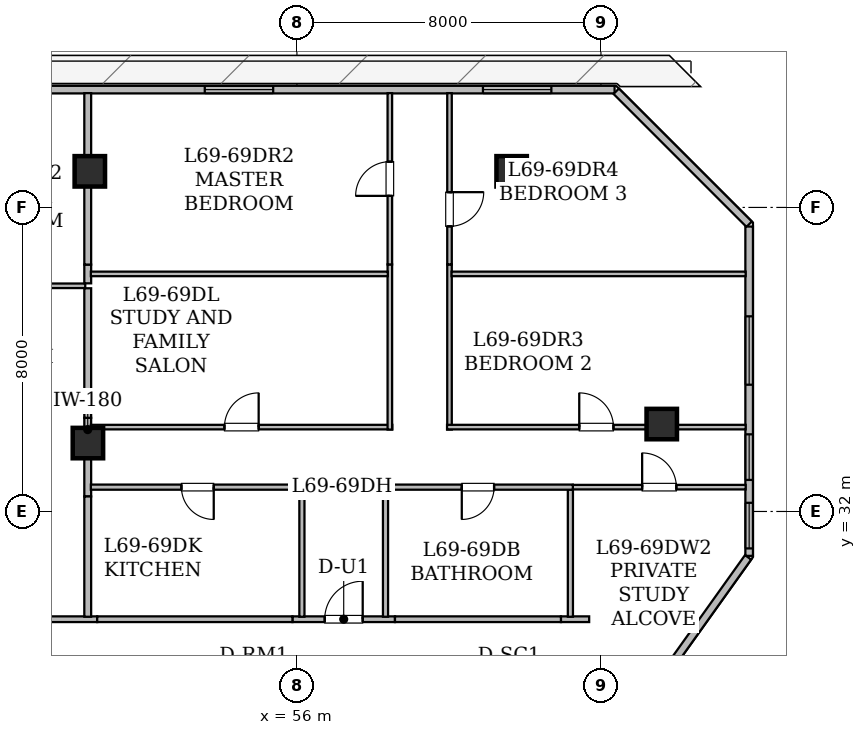
"""IFC4 building model, lengths in metres.
Left out: names, types, materials, properties, quantities, classifications, styles, units other than length and angle.
Written with IfcOpenShell. Run it as: python <this file> out.ifc"""

import sys

from ifc_helpers import new_model, si_unit, direction, frame, frame_2d, origin, origin_2d, place, context, subcontext, project, spatial, rectangle, hollow_rectangle, extrude, element, fill, save


model = new_model("IFC4")
c1 = context("Model", 3, precision=1e-05, world=origin(), true_north=direction((0.0, 1.0)))
c2 = subcontext(c1, "Body", "Model", "MODEL_VIEW")
j1 = project(units=[si_unit("LENGTHUNIT", "METRE"), si_unit("PLANEANGLEUNIT", "RADIAN")], contexts=[c1])
p1 = place(None, origin())
s1 = spatial("IfcSite", under=j1, at=p1, CompositionType="ELEMENT")
p2 = place(p1, origin())
s2 = spatial("IfcBuilding", under=s1, at=p2, CompositionType="ELEMENT")
p3 = place(p2, frame((0.0, 0.0, 269.45)))
s3 = spatial("IfcBuildingStorey", under=s2, at=p3, CompositionType="ELEMENT", Elevation=269.45)
for number, where, z_axis, x_axis in (
    (1, (50.55, 40.95, 0.025), (0.0, 0.0, 1.0), (1.0, 0.0, 0.0)),
    (2, (61.65, 40.95, 0.025), (0.0, 0.0, 1.0), (1.0, 0.0, 0.0)),
    (3, (65.6, 34.3, 0.025), (0.0, 0.0, 1.0), (1.0, 0.0, 0.0)),
    (4, (50.5, 33.8, 0.025), (0.0, 0.0, 1.0), (1.0, 0.0, 0.0)),
):
    element("IfcColumn", number, at=place(p3, frame(where, z_axis=z_axis, x_axis=x_axis)), inside=s3, PredefinedType="COLUMN", context=c2, shape_type="SweptSolid", body=[
        extrude(hollow_rectangle(XDim=0.8, YDim=0.8, WallThickness=0.04, at=origin_2d()), origin(), (0.0, 0.0, 1.0), 4.175),
    ])
p4 = place(p3, frame((25.702, 43.1, 0.0), z_axis=(0.0, 0.0, 1.0), x_axis=(1.0, 0.0, 0.0)))
e5 = element("IfcWall", 5, at=p4, inside=s3, PredefinedType="STANDARD", context=c2, shape_type="SweptSolid", body=[
    extrude(rectangle(XDim=38.657, YDim=0.2, at=frame_2d((19.329, 0.0))), origin(), (0.0, 0.0, 1.0), 3.95),
])
p5 = place(p4, frame((22.05, 0.0, 0.0)))
e6 = element("IfcOpeningElement", 6, at=p5, cuts=e5, PredefinedType="OPENING", context=c2, shape_type="SweptSolid", body=[
    extrude(rectangle(XDim=1.0, YDim=2.15, at=frame_2d((0.5, 1.075))), frame((0.0, 0.11, 0.0), z_axis=(0.0, -1.0, 0.0), x_axis=(1.0, 0.0, 0.0)), (0.0, 0.0, 1.0), 0.22),
])
p6 = place(p4, frame((18.633, 0.0, 0.78)))
e7 = element("IfcOpeningElement", 7, at=p6, cuts=e5, PredefinedType="OPENING", context=c2, shape_type="SweptSolid", body=[
    extrude(rectangle(XDim=1.2, YDim=1.5, at=frame_2d((0.6, 0.75))), frame((0.0, 0.11, 0.0), z_axis=(0.0, -1.0, 0.0), x_axis=(1.0, 0.0, 0.0)), (0.0, 0.0, 1.0), 0.22),
])
p7 = place(p4, frame((27.873, 0.0, 0.85)))
e8 = element("IfcOpeningElement", 8, at=p7, cuts=e5, PredefinedType="OPENING", context=c2, shape_type="SweptSolid", body=[
    extrude(rectangle(XDim=1.8, YDim=0.92, at=frame_2d((0.9, 0.46))), frame((0.0, 0.11, 0.0), z_axis=(0.0, -1.0, 0.0), x_axis=(1.0, 0.0, 0.0)), (0.0, 0.0, 1.0), 0.22),
])
p8 = place(p4, frame((35.193, 0.0, 0.85)))
e9 = element("IfcOpeningElement", 9, at=p8, cuts=e5, PredefinedType="OPENING", context=c2, shape_type="SweptSolid", body=[
    extrude(rectangle(XDim=1.8, YDim=0.92, at=frame_2d((0.9, 0.46))), frame((0.0, 0.11, 0.0), z_axis=(0.0, -1.0, 0.0), x_axis=(1.0, 0.0, 0.0)), (0.0, 0.0, 1.0), 0.22),
])
p9 = place(p3, frame((64.402, 43.057, 0.0), z_axis=(0.0, 0.0, 1.0), x_axis=(0.707106781187, -0.707106781187, 0.0)))
e10 = element("IfcWall", 10, at=p9, inside=s3, PredefinedType="STANDARD", context=c2, shape_type="SweptSolid", body=[
    extrude(rectangle(XDim=4.947, YDim=0.2, at=frame_2d((2.473, 0.0))), origin(), (0.0, 0.0, 1.0), 3.95),
])
p10 = place(p3, frame((67.9, 39.497, 0.0), z_axis=(0.0, 0.0, 1.0), x_axis=(0.0, -1.0, 0.0)))
e11 = element("IfcWall", 11, at=p10, inside=s3, PredefinedType="STANDARD", context=c2, shape_type="SweptSolid", body=[
    extrude(rectangle(XDim=8.665, YDim=0.2, at=frame_2d((4.333, 0.0))), origin(), (0.0, 0.0, 1.0), 3.95),
])
p11 = place(p10, frame((7.269, 0.0, 0.78)))
e12 = element("IfcOpeningElement", 12, at=p11, cuts=e11, PredefinedType="OPENING", context=c2, shape_type="SweptSolid", body=[
    extrude(rectangle(XDim=1.2, YDim=1.5, at=frame_2d((0.6, 0.75))), frame((0.0, 0.11, 0.0), z_axis=(0.0, -1.0, 0.0), x_axis=(1.0, 0.0, 0.0)), (0.0, 0.0, 1.0), 0.22),
])
p12 = place(p10, frame((5.467, 0.0, 0.78)))
e13 = element("IfcOpeningElement", 13, at=p12, cuts=e11, PredefinedType="OPENING", context=c2, shape_type="SweptSolid", body=[
    extrude(rectangle(XDim=1.2, YDim=1.5, at=frame_2d((0.6, 0.75))), frame((0.0, 0.11, 0.0), z_axis=(0.0, -1.0, 0.0), x_axis=(1.0, 0.0, 0.0)), (0.0, 0.0, 1.0), 0.22),
])
p13 = place(p10, frame((2.362, 0.0, 0.85)))
e14 = element("IfcOpeningElement", 14, at=p13, cuts=e11, PredefinedType="OPENING", context=c2, shape_type="SweptSolid", body=[
    extrude(rectangle(XDim=1.8, YDim=0.92, at=frame_2d((0.9, 0.46))), frame((0.0, 0.11, 0.0), z_axis=(0.0, -1.0, 0.0), x_axis=(1.0, 0.0, 0.0)), (0.0, 0.0, 1.0), 0.22),
])
p14 = place(p3, frame((67.872, 30.793, 0.0), z_axis=(0.0, 0.0, 1.0), x_axis=(-0.581265107027, -0.813714246743, 0.0)))
e15 = element("IfcWall", 15, at=p14, inside=s3, PredefinedType="STANDARD", context=c2, shape_type="SweptSolid", body=[
    extrude(rectangle(XDim=3.432, YDim=0.2, at=frame_2d((1.716, 0.0))), origin(), (0.0, 0.0, 1.0), 3.95),
])
p15 = place(p3, frame((45.974, 29.165, 0.0), z_axis=(0.0, 0.0, 1.0), x_axis=(1.0, 0.0, 0.0)))
e16 = element("IfcWall", 16, at=p15, inside=s3, PredefinedType="STANDARD", context=c2, shape_type="SweptSolid", body=[
    extrude(rectangle(XDim=4.77, YDim=0.15, at=frame_2d((2.385, 0.0))), origin(), (0.0, 0.0, 1.0), 3.245),
])
p16 = place(p3, frame((62.947, 29.165, 0.0), z_axis=(0.0, 0.0, 1.0), x_axis=(1.0, 0.0, 0.0)))
e17 = element("IfcWall", 17, at=p16, inside=s3, PredefinedType="STANDARD", context=c2, shape_type="SweptSolid", body=[
    extrude(rectangle(XDim=0.743, YDim=0.15, at=frame_2d((0.372, 0.0))), origin(), (0.0, 0.0, 1.0), 3.95),
])
p17 = place(p3, frame((55.882, 29.165, 0.0), z_axis=(0.0, 0.0, 1.0), x_axis=(1.0, 0.0, 0.0)))
e18 = element("IfcWall", 18, at=p17, inside=s3, PredefinedType="STANDARD", context=c2, shape_type="SweptSolid", body=[
    extrude(rectangle(XDim=2.698, YDim=0.15, at=frame_2d((1.349, 0.0))), origin(), (0.0, 0.0, 1.0), 3.95),
])
p18 = place(p17, frame((0.849, 0.0, 0.0)))
e19 = element("IfcOpeningElement", 19, at=p18, cuts=e18, PredefinedType="OPENING", context=c2, shape_type="SweptSolid", body=[
    extrude(rectangle(XDim=1.0, YDim=2.15, at=frame_2d((0.5, 1.075))), frame((0.0, 0.085, 0.0), z_axis=(0.0, -1.0, 0.0), x_axis=(1.0, 0.0, 0.0)), (0.0, 0.0, 1.0), 0.17),
])
p19 = place(p3, frame((58.58, 29.165, 0.0), z_axis=(0.0, 0.0, 1.0), x_axis=(1.0, 0.0, 0.0)))
e20 = element("IfcWall", 20, at=p19, inside=s3, PredefinedType="STANDARD", context=c2, shape_type="SweptSolid", body=[
    extrude(rectangle(XDim=4.367, YDim=0.15, at=frame_2d((2.184, 0.0))), origin(), (0.0, 0.0, 1.0), 3.95),
])
p20 = place(p3, frame((50.744, 29.165, 0.0), z_axis=(0.0, 0.0, 1.0), x_axis=(1.0, 0.0, 0.0)))
e21 = element("IfcWall", 21, at=p20, inside=s3, PredefinedType="STANDARD", context=c2, shape_type="SweptSolid", body=[
    extrude(rectangle(XDim=5.138, YDim=0.15, at=frame_2d((2.569, 0.0))), origin(), (0.0, 0.0, 1.0), 3.95),
])
p21 = place(p3, frame((45.779, 37.938, 0.0), z_axis=(0.0, 0.0, 1.0), x_axis=(1.0, 0.0, 0.0)))
e22 = element("IfcWall", 22, at=p21, inside=s3, PredefinedType="PARTITIONING", context=c2, shape_type="SweptSolid", body=[
    extrude(rectangle(XDim=4.651, YDim=0.12, at=frame_2d((2.325, 0.0))), origin(), (0.0, 0.0, 1.0), 3.245),
])
p22 = place(p3, frame((50.495, 34.464, 0.0), z_axis=(0.0, 0.0, 1.0), x_axis=(0.0, -1.0, 0.0)))
e23 = element("IfcWall", 23, at=p22, inside=s3, PredefinedType="STANDARD", context=c2, shape_type="SweptSolid", body=[
    extrude(rectangle(XDim=2.069, YDim=0.18, at=frame_2d((1.035, 0.0))), origin(), (0.0, 0.0, 1.0), 3.237),
])
p23 = place(p3, frame((50.495, 32.395, 0.0), z_axis=(0.0, 0.0, 1.0), x_axis=(0.0, -1.0, 0.0)))
e24 = element("IfcWall", 24, at=p23, inside=s3, PredefinedType="STANDARD", context=c2, shape_type="SweptSolid", body=[
    extrude(rectangle(XDim=3.165, YDim=0.18, at=frame_2d((1.583, 0.0))), origin(), (0.0, 0.0, 1.0), 3.237),
])
p24 = place(p3, frame((50.495, 37.873, 0.0), z_axis=(0.0, 0.0, 1.0), x_axis=(0.0, -1.0, 0.0)))
e25 = element("IfcWall", 25, at=p24, inside=s3, PredefinedType="STANDARD", context=c2, shape_type="SweptSolid", body=[
    extrude(rectangle(XDim=3.409, YDim=0.18, at=frame_2d((1.705, 0.0))), origin(), (0.0, 0.0, 1.0), 3.245),
])
p25 = place(p3, frame((50.495, 38.496, 0.0), z_axis=(0.0, 0.0, 1.0), x_axis=(0.0, -1.0, 0.0)))
e26 = element("IfcWall", 26, at=p25, inside=s3, PredefinedType="STANDARD", context=c2, shape_type="SweptSolid", body=[
    extrude(rectangle(XDim=0.493, YDim=0.18, at=frame_2d((0.247, 0.0))), origin(), (0.0, 0.0, 1.0), 3.245),
])
p26 = place(p3, frame((50.495, 43.008, 0.0), z_axis=(0.0, 0.0, 1.0), x_axis=(0.0, -1.0, 0.0)))
e27 = element("IfcWall", 27, at=p26, inside=s3, PredefinedType="STANDARD", context=c2, shape_type="SweptSolid", body=[
    extrude(rectangle(XDim=4.512, YDim=0.18, at=frame_2d((2.256, 0.0))), origin(), (0.0, 0.0, 1.0), 3.245),
])
p27 = place(p3, frame((63.261, 32.64, 0.0), z_axis=(0.0, 0.0, 1.0), x_axis=(1.0, 0.0, 0.0)))
e28 = element("IfcWall", 28, at=p27, inside=s3, PredefinedType="PARTITIONING", context=c2, shape_type="SweptSolid", body=[
    extrude(rectangle(XDim=4.547, YDim=0.12, at=frame_2d((2.273, 0.0))), origin(), (0.0, 0.0, 1.0), 3.407),
])
p28 = place(p27, frame((1.823, 0.0, 0.0)))
e29 = element("IfcOpeningElement", 29, at=p28, cuts=e28, PredefinedType="OPENING", context=c2, shape_type="SweptSolid", body=[
    extrude(rectangle(XDim=0.9, YDim=2.1, at=frame_2d((0.45, 1.05))), frame((0.0, 0.07, 0.0), z_axis=(0.0, -1.0, 0.0), x_axis=(1.0, 0.0, 0.0)), (0.0, 0.0, 1.0), 0.14),
])
p29 = place(p3, frame((63.196, 29.23, 0.0), z_axis=(0.0, 0.0, 1.0), x_axis=(0.0, 1.0, 0.0)))
e30 = element("IfcWall", 30, at=p29, inside=s3, PredefinedType="PARTITIONING", context=c2, shape_type="SweptSolid", body=[
    extrude(rectangle(XDim=3.345, YDim=0.135, at=frame_2d((1.672, 0.0))), origin(), (0.0, 0.0, 1.0), 3.237),
])
p30 = place(p3, frame((63.261, 32.64, 0.0), z_axis=(0.0, 0.0, 1.0), x_axis=(-1.0, 0.0, 0.0)))
e31 = element("IfcWall", 31, at=p30, inside=s3, PredefinedType="PARTITIONING", context=c2, shape_type="SweptSolid", body=[
    extrude(rectangle(XDim=4.995, YDim=0.135, at=frame_2d((2.498, 0.0))), origin(), (0.0, 0.0, 1.0), 3.95),
])
p31 = place(p30, frame((2.073, 0.0, 0.0)))
e32 = element("IfcOpeningElement", 32, at=p31, cuts=e31, PredefinedType="OPENING", context=c2, shape_type="SweptSolid", body=[
    extrude(rectangle(XDim=0.85, YDim=2.1, at=frame_2d((0.425, 1.05))), frame((0.0, 0.077, 0.0), z_axis=(0.0, -1.0, 0.0), x_axis=(1.0, 0.0, 0.0)), (0.0, 0.0, 1.0), 0.155),
])
for number, where, z_axis, x_axis in (
    (33, (58.331, 32.705, 0.0), (0.0, 0.0, 1.0), (0.0, -1.0, 0.0)),
    (34, (56.131, 29.23, 0.0), (0.0, 0.0, 1.0), (0.0, 1.0, 0.0)),
):
    element("IfcWall", number, at=place(p3, frame(where, z_axis=z_axis, x_axis=x_axis)), inside=s3, PredefinedType="PARTITIONING", context=c2, shape_type="SweptSolid", body=[
        extrude(rectangle(XDim=3.475, YDim=0.135, at=frame_2d((1.738, 0.0))), origin(), (0.0, 0.0, 1.0), 3.237),
    ])
p32 = place(p3, frame((56.196, 32.64, 0.0), z_axis=(0.0, 0.0, 1.0), x_axis=(-1.0, 0.0, 0.0)))
e35 = element("IfcWall", 35, at=p32, inside=s3, PredefinedType="PARTITIONING", context=c2, shape_type="SweptSolid", body=[
    extrude(rectangle(XDim=5.619, YDim=0.135, at=frame_2d((2.81, 0.0))), origin(), (0.0, 0.0, 1.0), 3.245),
])
p33 = place(p32, frame((2.385, 0.0, 0.0)))
e36 = element("IfcOpeningElement", 36, at=p33, cuts=e35, PredefinedType="OPENING", context=c2, shape_type="SweptSolid", body=[
    extrude(rectangle(XDim=0.85, YDim=2.1, at=frame_2d((0.425, 1.05))), frame((0.0, 0.077, 0.0), z_axis=(0.0, -1.0, 0.0), x_axis=(1.0, 0.0, 0.0)), (0.0, 0.0, 1.0), 0.155),
])
p34 = place(p3, frame((50.577, 34.22, 0.0), z_axis=(0.0, 0.0, 1.0), x_axis=(1.0, 0.0, 0.0)))
e37 = element("IfcWall", 37, at=p34, inside=s3, PredefinedType="PARTITIONING", context=c2, shape_type="SweptSolid", body=[
    extrude(rectangle(XDim=7.933, YDim=0.12, at=frame_2d((3.967, 0.0))), origin(), (0.0, 0.0, 1.0), 3.237),
])
p35 = place(p34, frame((3.516, 0.0, 0.0)))
e38 = element("IfcOpeningElement", 38, at=p35, cuts=e37, PredefinedType="OPENING", context=c2, shape_type="SweptSolid", body=[
    extrude(rectangle(XDim=0.9, YDim=2.1, at=frame_2d((0.45, 1.05))), frame((0.0, 0.07, 0.0), z_axis=(0.0, -1.0, 0.0), x_axis=(1.0, 0.0, 0.0)), (0.0, 0.0, 1.0), 0.14),
])
p36 = place(p3, frame((58.445, 34.155, 0.0), z_axis=(0.0, 0.0, 1.0), x_axis=(0.0, 1.0, 0.0)))
e39 = element("IfcWall", 39, at=p36, inside=s3, PredefinedType="PARTITIONING", context=c2, shape_type="SweptSolid", body=[
    extrude(rectangle(XDim=4.345, YDim=0.12, at=frame_2d((2.172, 0.0))), origin(), (0.0, 0.0, 1.0), 3.237),
])
p37 = place(p3, frame((58.445, 38.5, 0.0), z_axis=(0.0, 0.0, 1.0), x_axis=(0.0, 1.0, 0.0)))
e40 = element("IfcWall", 40, at=p37, inside=s3, PredefinedType="PARTITIONING", context=c2, shape_type="SweptSolid", body=[
    extrude(rectangle(XDim=4.508, YDim=0.12, at=frame_2d((2.254, 0.0))), origin(), (0.0, 0.0, 1.0), 3.245),
])
p38 = place(p37, frame((1.804, 0.0, 0.0)))
e41 = element("IfcOpeningElement", 41, at=p38, cuts=e40, PredefinedType="OPENING", context=c2, shape_type="SweptSolid", body=[
    extrude(rectangle(XDim=0.9, YDim=2.1, at=frame_2d((0.45, 1.05))), frame((0.0, 0.07, 0.0), z_axis=(0.0, -1.0, 0.0), x_axis=(1.0, 0.0, 0.0)), (0.0, 0.0, 1.0), 0.14),
])
p39 = place(p3, frame((60.015, 38.5, 0.0), z_axis=(0.0, 0.0, 1.0), x_axis=(0.0, -1.0, 0.0)))
e42 = element("IfcWall", 42, at=p39, inside=s3, PredefinedType="PARTITIONING", context=c2, shape_type="SweptSolid", body=[
    extrude(rectangle(XDim=4.345, YDim=0.12, at=frame_2d((2.172, 0.0))), origin(), (0.0, 0.0, 1.0), 3.237),
])
p40 = place(p3, frame((59.95, 34.22, 0.0), z_axis=(0.0, 0.0, 1.0), x_axis=(1.0, 0.0, 0.0)))
e43 = element("IfcWall", 43, at=p40, inside=s3, PredefinedType="PARTITIONING", context=c2, shape_type="SweptSolid", body=[
    extrude(rectangle(XDim=7.858, YDim=0.12, at=frame_2d((3.929, 0.0))), origin(), (0.0, 0.0, 1.0), 3.237),
])
p41 = place(p40, frame((3.479, 0.0, 0.0)))
e44 = element("IfcOpeningElement", 44, at=p41, cuts=e43, PredefinedType="OPENING", context=c2, shape_type="SweptSolid", body=[
    extrude(rectangle(XDim=0.9, YDim=2.1, at=frame_2d((0.45, 1.05))), frame((0.0, 0.07, 0.0), z_axis=(0.0, -1.0, 0.0), x_axis=(1.0, 0.0, 0.0)), (0.0, 0.0, 1.0), 0.14),
])
p42 = place(p3, frame((60.015, 43.008, 0.0), z_axis=(0.0, 0.0, 1.0), x_axis=(0.0, -1.0, 0.0)))
e45 = element("IfcWall", 45, at=p42, inside=s3, PredefinedType="PARTITIONING", context=c2, shape_type="SweptSolid", body=[
    extrude(rectangle(XDim=4.508, YDim=0.12, at=frame_2d((2.254, 0.0))), origin(), (0.0, 0.0, 1.0), 3.245),
])
p43 = place(p42, frame((2.606, 0.0, 0.0)))
e46 = element("IfcOpeningElement", 46, at=p43, cuts=e45, PredefinedType="OPENING", context=c2, shape_type="SweptSolid", body=[
    extrude(rectangle(XDim=0.9, YDim=2.1, at=frame_2d((0.45, 1.05))), frame((0.0, 0.07, 0.0), z_axis=(0.0, -1.0, 0.0), x_axis=(1.0, 0.0, 0.0)), (0.0, 0.0, 1.0), 0.14),
])
p44 = place(p3, frame((50.577, 38.251, 0.0), z_axis=(0.0, 0.0, 1.0), x_axis=(1.0, 0.0, 0.0)))
e47 = element("IfcWall", 47, at=p44, inside=s3, PredefinedType="PARTITIONING", context=c2, shape_type="SweptSolid", body=[
    extrude(rectangle(XDim=7.814, YDim=0.12, at=frame_2d((3.907, 0.0))), origin(), (0.0, 0.0, 1.0), 3.245),
])
p45 = place(p3, frame((60.069, 38.251, 0.0), z_axis=(0.0, 0.0, 1.0), x_axis=(1.0, 0.0, 0.0)))
e48 = element("IfcWall", 48, at=p45, inside=s3, PredefinedType="PARTITIONING", context=c2, shape_type="SweptSolid", body=[
    extrude(rectangle(XDim=7.739, YDim=0.12, at=frame_2d((3.87, 0.0))), origin(), (0.0, 0.0, 1.0), 3.407),
])
p46 = place(p11, origin())
e49 = element("IfcWindow", 49, at=p46, inside=s3, PartitioningType="SINGLE_PANEL", PredefinedType="WINDOW", context=c2, shape_type="SweptSolid", body=[
    extrude(rectangle(XDim=1.2, YDim=1.5, at=frame_2d((0.6, 0.75))), frame((0.0, 0.03, 0.0), z_axis=(0.0, -1.0, 0.0), x_axis=(1.0, 0.0, 0.0)), (0.0, 0.0, 1.0), 0.06),
])
fill(e12, e49)
p47 = place(p12, origin())
e50 = element("IfcWindow", 50, at=p47, inside=s3, PartitioningType="SINGLE_PANEL", PredefinedType="WINDOW", context=c2, shape_type="SweptSolid", body=[
    extrude(rectangle(XDim=1.2, YDim=1.5, at=frame_2d((0.6, 0.75))), frame((0.0, 0.03, 0.0), z_axis=(0.0, -1.0, 0.0), x_axis=(1.0, 0.0, 0.0)), (0.0, 0.0, 1.0), 0.06),
])
fill(e13, e50)
p48 = place(p7, origin())
e51 = element("IfcWindow", 51, at=p48, inside=s3, PartitioningType="SINGLE_PANEL", PredefinedType="WINDOW", context=c2, shape_type="SweptSolid", body=[
    extrude(rectangle(XDim=1.8, YDim=0.92, at=frame_2d((0.9, 0.46))), frame((0.0, 0.03, 0.0), z_axis=(0.0, -1.0, 0.0), x_axis=(1.0, 0.0, 0.0)), (0.0, 0.0, 1.0), 0.06),
])
fill(e8, e51)
p49 = place(p13, origin())
e52 = element("IfcWindow", 52, at=p49, inside=s3, PartitioningType="SINGLE_PANEL", PredefinedType="WINDOW", context=c2, shape_type="SweptSolid", body=[
    extrude(rectangle(XDim=1.8, YDim=0.92, at=frame_2d((0.9, 0.46))), frame((0.0, 0.03, 0.0), z_axis=(0.0, -1.0, 0.0), x_axis=(1.0, 0.0, 0.0)), (0.0, 0.0, 1.0), 0.06),
])
fill(e14, e52)
p50 = place(p8, origin())
e53 = element("IfcWindow", 53, at=p50, inside=s3, PartitioningType="SINGLE_PANEL", PredefinedType="WINDOW", context=c2, shape_type="SweptSolid", body=[
    extrude(rectangle(XDim=1.8, YDim=0.92, at=frame_2d((0.9, 0.46))), frame((0.0, 0.03, 0.0), z_axis=(0.0, -1.0, 0.0), x_axis=(1.0, 0.0, 0.0)), (0.0, 0.0, 1.0), 0.06),
])
fill(e9, e53)
p51 = place(p18, origin())
e54 = element("IfcDoor", 54, at=p51, inside=s3, OperationType="SINGLE_SWING_RIGHT", PredefinedType="DOOR", context=c2, shape_type="SweptSolid", body=[
    extrude(rectangle(XDim=1.0, YDim=2.15, at=frame_2d((0.5, 1.075))), frame((0.0, 0.025, 0.0), z_axis=(0.0, -1.0, 0.0), x_axis=(1.0, 0.0, 0.0)), (0.0, 0.0, 1.0), 0.05),
])
fill(e19, e54)
p52 = place(p28, origin())
e55 = element("IfcDoor", 55, at=p52, inside=s3, OperationType="SINGLE_SWING_LEFT", PredefinedType="DOOR", context=c2, shape_type="SweptSolid", body=[
    extrude(rectangle(XDim=0.9, YDim=2.1, at=frame_2d((0.45, 1.05))), frame((0.0, 0.025, 0.0), z_axis=(0.0, -1.0, 0.0), x_axis=(1.0, 0.0, 0.0)), (0.0, 0.0, 1.0), 0.05),
])
fill(e29, e55)
p53 = place(p31, origin())
e56 = element("IfcDoor", 56, at=p53, inside=s3, OperationType="SINGLE_SWING_RIGHT", PredefinedType="DOOR", context=c2, shape_type="SweptSolid", body=[
    extrude(rectangle(XDim=0.85, YDim=2.1, at=frame_2d((0.425, 1.05))), frame((0.0, 0.025, 0.0), z_axis=(0.0, -1.0, 0.0), x_axis=(1.0, 0.0, 0.0)), (0.0, 0.0, 1.0), 0.05),
])
fill(e32, e56)
p54 = place(p33, origin())
e57 = element("IfcDoor", 57, at=p54, inside=s3, OperationType="SINGLE_SWING_LEFT", PredefinedType="DOOR", context=c2, shape_type="SweptSolid", body=[
    extrude(rectangle(XDim=0.85, YDim=2.1, at=frame_2d((0.425, 1.05))), frame((0.0, 0.025, 0.0), z_axis=(0.0, -1.0, 0.0), x_axis=(1.0, 0.0, 0.0)), (0.0, 0.0, 1.0), 0.05),
])
fill(e36, e57)
p55 = place(p35, origin())
e58 = element("IfcDoor", 58, at=p55, inside=s3, OperationType="SINGLE_SWING_RIGHT", PredefinedType="DOOR", context=c2, shape_type="SweptSolid", body=[
    extrude(rectangle(XDim=0.9, YDim=2.1, at=frame_2d((0.45, 1.05))), frame((0.0, 0.025, 0.0), z_axis=(0.0, -1.0, 0.0), x_axis=(1.0, 0.0, 0.0)), (0.0, 0.0, 1.0), 0.05),
])
fill(e38, e58)
p56 = place(p38, origin())
e59 = element("IfcDoor", 59, at=p56, inside=s3, OperationType="SINGLE_SWING_LEFT", PredefinedType="DOOR", context=c2, shape_type="SweptSolid", body=[
    extrude(rectangle(XDim=0.9, YDim=2.1, at=frame_2d((0.45, 1.05))), frame((0.0, 0.025, 0.0), z_axis=(0.0, -1.0, 0.0), x_axis=(1.0, 0.0, 0.0)), (0.0, 0.0, 1.0), 0.05),
])
fill(e41, e59)
p57 = place(p41, origin())
e60 = element("IfcDoor", 60, at=p57, inside=s3, OperationType="SINGLE_SWING_LEFT", PredefinedType="DOOR", context=c2, shape_type="SweptSolid", body=[
    extrude(rectangle(XDim=0.9, YDim=2.1, at=frame_2d((0.45, 1.05))), frame((0.0, 0.025, 0.0), z_axis=(0.0, -1.0, 0.0), x_axis=(1.0, 0.0, 0.0)), (0.0, 0.0, 1.0), 0.05),
])
fill(e44, e60)
p58 = place(p43, origin())
e61 = element("IfcDoor", 61, at=p58, inside=s3, OperationType="SINGLE_SWING_LEFT", PredefinedType="DOOR", context=c2, shape_type="SweptSolid", body=[
    extrude(rectangle(XDim=0.9, YDim=2.1, at=frame_2d((0.45, 1.05))), frame((0.0, 0.025, 0.0), z_axis=(0.0, -1.0, 0.0), x_axis=(1.0, 0.0, 0.0)), (0.0, 0.0, 1.0), 0.05),
])
fill(e46, e61)
save(model, sys.argv[1])
